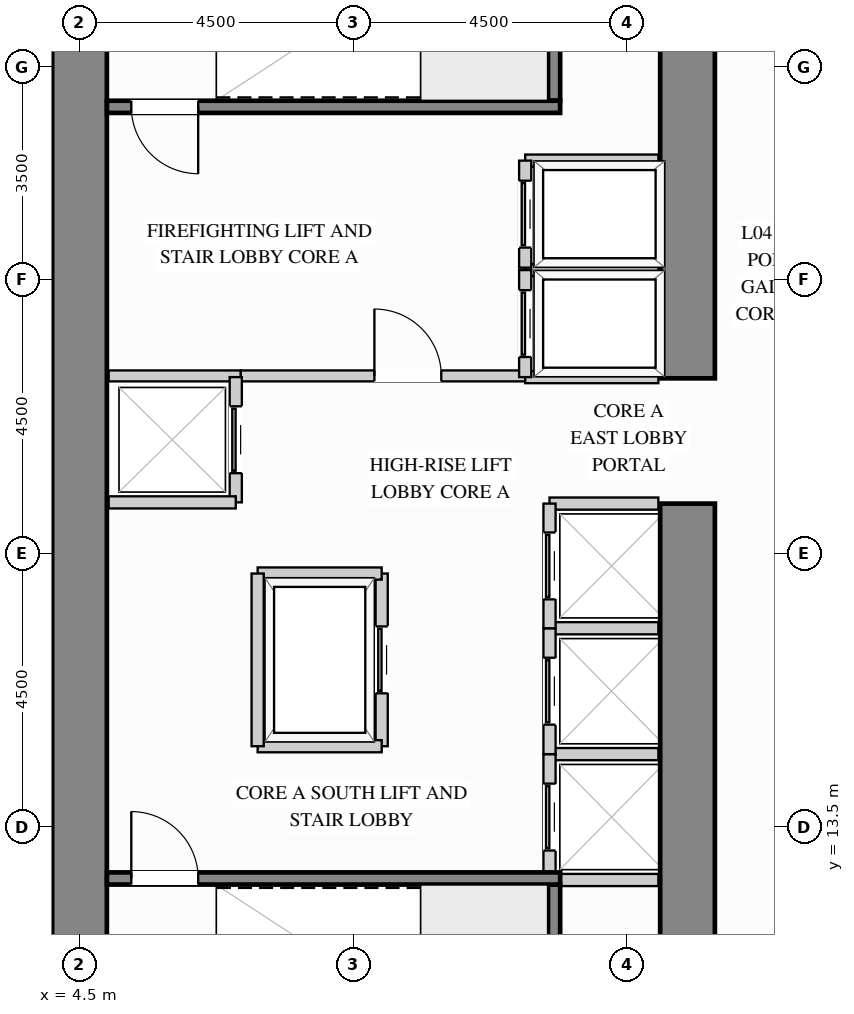
"""IFC4 building model, lengths in metres.
Left out: names, types, materials, properties, quantities, classifications, styles, units other than length and angle.
Written with IfcOpenShell. Run it as: python <this file> out.ifc"""

import sys

from ifc_helpers import new_model, si_unit, direction, frame, frame_2d, origin, place, context, subcontext, project, spatial, rectangle, extrude, source, transform, mapped, element, fill, save


model = new_model("IFC4")
c1 = context("Model", 3, precision=1e-05, world=origin(), true_north=direction((0.0, 1.0)))
c2 = subcontext(c1, "Body", "Model", "MODEL_VIEW")
j1 = project(units=[si_unit("LENGTHUNIT", "METRE"), si_unit("PLANEANGLEUNIT", "RADIAN")], contexts=[c1])
p1 = place(None, origin())
s1 = spatial("IfcSite", under=j1, at=p1, CompositionType="ELEMENT")
p2 = place(p1, origin())
s2 = spatial("IfcBuilding", under=s1, at=p2, CompositionType="ELEMENT")
p3 = place(p2, frame((0.0, 0.0, 18.0)))
s3 = spatial("IfcBuildingStorey", under=s2, at=p3, CompositionType="ELEMENT", Elevation=18.0)
m1 = source(origin(), c2, "Body", "SweptSolid", [
    extrude(rectangle(XDim=9.87, YDim=0.9, at=frame_2d((4.935, 0.0))), origin(), (0.0, 0.0, 1.0), 4.28),
])
p4 = place(p3, frame((14.5, 8.95, 0.0), z_axis=(0.0, 0.0, 1.0), x_axis=(0.0, 1.0, 0.0)))
e1 = element("IfcWall", 1, at=p4, inside=s3, PredefinedType="SHEAR", context=c2, shape_type="MappedRepresentation", body=[
    mapped(m1, transform((0.0, 0.0, 0.0), x_axis=(1.0, 0.0, 0.0), y_axis=(0.0, 1.0, 0.0), z_axis=(0.0, 0.0, 1.0))),
])
m2 = source(origin(), c2, "Body", "SweptSolid", [
    extrude(rectangle(XDim=8.17, YDim=0.9, at=frame_2d((4.085, 0.0))), origin(), (0.0, 0.0, 1.0), 4.28),
])
p5 = place(p3, frame((14.5, 20.88, 0.0), z_axis=(0.0, 0.0, 1.0), x_axis=(0.0, 1.0, 0.0)))
e2 = element("IfcWall", 2, at=p5, inside=s3, PredefinedType="SHEAR", context=c2, shape_type="MappedRepresentation", body=[
    mapped(m2, transform((0.0, 0.0, 0.0), x_axis=(1.0, 0.0, 0.0), y_axis=(0.0, 1.0, 0.0), z_axis=(0.0, 0.0, 1.0))),
])
m3 = source(origin(), c2, "Body", "SweptSolid", [
    extrude(rectangle(XDim=20.1, YDim=0.9, at=frame_2d((10.05, 0.0))), origin(), (0.0, 0.0, 1.0), 4.28),
])
p6 = place(p3, frame((4.5, 8.95, 0.0), z_axis=(0.0, 0.0, 1.0), x_axis=(0.0, 1.0, 0.0)))
e3 = element("IfcWall", 3, at=p6, inside=s3, PredefinedType="SHEAR", context=c2, shape_type="MappedRepresentation", body=[
    mapped(m3, transform((0.0, 0.0, 0.0), x_axis=(1.0, 0.0, 0.0), y_axis=(0.0, 1.0, 0.0), z_axis=(0.0, 0.0, 1.0))),
])
p7 = place(p3, frame((7.15, 20.92, 0.0), z_axis=(0.0, 0.0, 1.0), x_axis=(1.0, 0.0, 0.0)))
e4 = element("IfcWall", 4, at=p7, inside=s3, PredefinedType="PARTITIONING", context=c2, shape_type="SweptSolid", body=[
    extrude(rectangle(XDim=4.68, YDim=0.18, at=frame_2d((2.34, 0.0))), origin(), (0.0, 0.0, 1.0), 4.265),
])
p8 = place(p7, frame((2.2, 0.0, 0.0)))
e5 = element("IfcOpeningElement", 5, at=p8, cuts=e4, PredefinedType="OPENING", context=c2, shape_type="SweptSolid", body=[
    extrude(rectangle(XDim=1.1, YDim=2.15, at=frame_2d((0.55, 1.075))), frame((0.0, 0.1, 0.0), z_axis=(0.0, -1.0, 0.0), x_axis=(1.0, 0.0, 0.0)), (0.0, 0.0, 1.0), 0.2),
])
m4 = source(origin(), c2, "Body", "SweptSolid", [
    extrude(rectangle(XDim=2.17, YDim=0.18, at=frame_2d((1.085, 0.0))), origin(), (0.0, 0.0, 1.0), 4.265),
])
p9 = place(p3, frame((4.98, 20.92, 0.0), z_axis=(0.0, 0.0, 1.0), x_axis=(1.0, 0.0, 0.0)))
e6 = element("IfcWall", 6, at=p9, inside=s3, PredefinedType="PARTITIONING", context=c2, shape_type="MappedRepresentation", body=[
    mapped(m4, transform((0.0, 0.0, 0.0), x_axis=(1.0, 0.0, 0.0), y_axis=(0.0, 1.0, 0.0), z_axis=(0.0, 0.0, 1.0))),
])
m5 = source(origin(), c2, "Body", "SweptSolid", [
    extrude(rectangle(XDim=2.19, YDim=0.2, at=frame_2d((1.095, 0.0))), origin(), (0.0, 0.0, 1.0), 4.265),
])
for number, where, z_axis, x_axis in (
    (7, (11.83, 22.66, 0.0), (0.0, 0.0, 1.0), (1.0, 0.0, 0.0)),
    (8, (11.83, 20.9, 0.0), (0.0, 0.0, 1.0), (1.0, 0.0, 0.0)),
):
    element("IfcWall", number, at=place(p3, frame(where, z_axis=z_axis, x_axis=x_axis)), inside=s3, PredefinedType="PARTITIONING", context=c2, shape_type="MappedRepresentation", body=[
        mapped(m5, transform((0.0, 0.0, 0.0), x_axis=(1.0, 0.0, 0.0), y_axis=(0.0, 1.0, 0.0), z_axis=(0.0, 0.0, 1.0))),
    ])
p10 = place(p3, frame((11.83, 20.9, 0.0), z_axis=(0.0, 0.0, 1.0), x_axis=(0.0, 1.0, 0.0)))
e9 = element("IfcWall", 9, at=p10, inside=s3, PredefinedType="PARTITIONING", context=c2, shape_type="SweptSolid", body=[
    extrude(rectangle(XDim=1.76, YDim=0.2, at=frame_2d((0.88, 0.0))), origin(), (0.0, 0.0, 1.0), 4.265),
])
p11 = place(p10, frame((0.33, 0.0, 0.0)))
e10 = element("IfcOpeningElement", 10, at=p11, cuts=e9, PredefinedType="OPENING", context=c2, shape_type="SweptSolid", body=[
    extrude(rectangle(XDim=1.1, YDim=2.2, at=frame_2d((0.55, 1.1))), frame((0.0, 0.11, 0.0), z_axis=(0.0, -1.0, 0.0), x_axis=(1.0, 0.0, 0.0)), (0.0, 0.0, 1.0), 0.22),
])
p12 = place(p3, frame((11.83, 24.46, 0.0), z_axis=(0.0, 0.0, 1.0), x_axis=(1.0, 0.0, 0.0)))
e11 = element("IfcWall", 11, at=p12, inside=s3, PredefinedType="PARTITIONING", context=c2, shape_type="MappedRepresentation", body=[
    mapped(m5, transform((0.0, 0.0, 0.0), x_axis=(1.0, 0.0, 0.0), y_axis=(0.0, 1.0, 0.0), z_axis=(0.0, 0.0, 1.0))),
])
p13 = place(p3, frame((11.83, 22.7, 0.0), z_axis=(0.0, 0.0, 1.0), x_axis=(0.0, 1.0, 0.0)))
e12 = element("IfcWall", 12, at=p13, inside=s3, PredefinedType="PARTITIONING", context=c2, shape_type="SweptSolid", body=[
    extrude(rectangle(XDim=1.76, YDim=0.2, at=frame_2d((0.88, 0.0))), origin(), (0.0, 0.0, 1.0), 4.265),
])
p14 = place(p13, frame((0.33, 0.0, 0.0)))
e13 = element("IfcOpeningElement", 13, at=p14, cuts=e12, PredefinedType="OPENING", context=c2, shape_type="SweptSolid", body=[
    extrude(rectangle(XDim=1.1, YDim=2.2, at=frame_2d((0.55, 1.1))), frame((0.0, 0.11, 0.0), z_axis=(0.0, -1.0, 0.0), x_axis=(1.0, 0.0, 0.0)), (0.0, 0.0, 1.0), 0.22),
])
m6 = source(origin(), c2, "Body", "SweptSolid", [
    extrude(rectangle(XDim=1.79, YDim=0.2, at=frame_2d((0.895, 0.0))), origin(), (0.0, 0.0, 1.0), 4.265),
])
for number, where, z_axis, x_axis in (
    (14, (12.23, 14.7, 0.0), (0.0, 0.0, 1.0), (1.0, 0.0, 0.0)),
    (15, (12.23, 12.63, 0.0), (0.0, 0.0, 1.0), (1.0, 0.0, 0.0)),
):
    element("IfcWall", number, at=place(p3, frame(where, z_axis=z_axis, x_axis=x_axis)), inside=s3, PredefinedType="PARTITIONING", context=c2, shape_type="MappedRepresentation", body=[
        mapped(m6, transform((0.0, 0.0, 0.0), x_axis=(1.0, 0.0, 0.0), y_axis=(0.0, 1.0, 0.0), z_axis=(0.0, 0.0, 1.0))),
    ])
p15 = place(p3, frame((12.23, 12.63, 0.0), z_axis=(0.0, 0.0, 1.0), x_axis=(0.0, 1.0, 0.0)))
e16 = element("IfcWall", 16, at=p15, inside=s3, PredefinedType="PARTITIONING", context=c2, shape_type="SweptSolid", body=[
    extrude(rectangle(XDim=2.07, YDim=0.2, at=frame_2d((1.035, 0.0))), origin(), (0.0, 0.0, 1.0), 4.265),
])
p16 = place(p15, frame((0.485, 0.0, 0.0)))
e17 = element("IfcOpeningElement", 17, at=p16, cuts=e16, PredefinedType="OPENING", context=c2, shape_type="SweptSolid", body=[
    extrude(rectangle(XDim=1.1, YDim=2.2, at=frame_2d((0.55, 1.1))), frame((0.0, 0.11, 0.0), z_axis=(0.0, -1.0, 0.0), x_axis=(1.0, 0.0, 0.0)), (0.0, 0.0, 1.0), 0.22),
])
p17 = place(p3, frame((12.23, 16.77, 0.0), z_axis=(0.0, 0.0, 1.0), x_axis=(1.0, 0.0, 0.0)))
e18 = element("IfcWall", 18, at=p17, inside=s3, PredefinedType="PARTITIONING", context=c2, shape_type="MappedRepresentation", body=[
    mapped(m6, transform((0.0, 0.0, 0.0), x_axis=(1.0, 0.0, 0.0), y_axis=(0.0, 1.0, 0.0), z_axis=(0.0, 0.0, 1.0))),
])
p18 = place(p3, frame((12.23, 14.7, 0.0), z_axis=(0.0, 0.0, 1.0), x_axis=(0.0, 1.0, 0.0)))
e19 = element("IfcWall", 19, at=p18, inside=s3, PredefinedType="PARTITIONING", context=c2, shape_type="SweptSolid", body=[
    extrude(rectangle(XDim=2.07, YDim=0.2, at=frame_2d((1.035, 0.0))), origin(), (0.0, 0.0, 1.0), 4.265),
])
p19 = place(p18, frame((0.485, 0.0, 0.0)))
e20 = element("IfcOpeningElement", 20, at=p19, cuts=e19, PredefinedType="OPENING", context=c2, shape_type="SweptSolid", body=[
    extrude(rectangle(XDim=1.1, YDim=2.2, at=frame_2d((0.55, 1.1))), frame((0.0, 0.11, 0.0), z_axis=(0.0, -1.0, 0.0), x_axis=(1.0, 0.0, 0.0)), (0.0, 0.0, 1.0), 0.22),
])
p20 = place(p3, frame((12.23, 18.82, 0.0), z_axis=(0.0, 0.0, 1.0), x_axis=(1.0, 0.0, 0.0)))
e21 = element("IfcWall", 21, at=p20, inside=s3, PredefinedType="PARTITIONING", context=c2, shape_type="MappedRepresentation", body=[
    mapped(m6, transform((0.0, 0.0, 0.0), x_axis=(1.0, 0.0, 0.0), y_axis=(0.0, 1.0, 0.0), z_axis=(0.0, 0.0, 1.0))),
])
p21 = place(p3, frame((12.23, 16.77, 0.0), z_axis=(0.0, 0.0, 1.0), x_axis=(0.0, 1.0, 0.0)))
e22 = element("IfcWall", 22, at=p21, inside=s3, PredefinedType="PARTITIONING", context=c2, shape_type="SweptSolid", body=[
    extrude(rectangle(XDim=2.05, YDim=0.2, at=frame_2d((1.025, 0.0))), origin(), (0.0, 0.0, 1.0), 4.265),
])
p22 = place(p21, frame((0.475, 0.0, 0.0)))
e23 = element("IfcOpeningElement", 23, at=p22, cuts=e22, PredefinedType="OPENING", context=c2, shape_type="SweptSolid", body=[
    extrude(rectangle(XDim=1.1, YDim=2.2, at=frame_2d((0.55, 1.1))), frame((0.0, 0.11, 0.0), z_axis=(0.0, -1.0, 0.0), x_axis=(1.0, 0.0, 0.0)), (0.0, 0.0, 1.0), 0.22),
])
p23 = place(p3, frame((7.07, 18.84, 0.0), z_axis=(0.0, 0.0, 1.0), x_axis=(0.0, 1.0, 0.0)))
e24 = element("IfcWall", 24, at=p23, inside=s3, PredefinedType="PARTITIONING", context=c2, shape_type="SweptSolid", body=[
    extrude(rectangle(XDim=2.06, YDim=0.2, at=frame_2d((1.03, 0.0))), origin(), (0.0, 0.0, 1.0), 4.265),
])
p24 = place(p23, frame((0.48, 0.0, 0.0)))
e25 = element("IfcOpeningElement", 25, at=p24, cuts=e24, PredefinedType="OPENING", context=c2, shape_type="SweptSolid", body=[
    extrude(rectangle(XDim=1.1, YDim=2.2, at=frame_2d((0.55, 1.1))), frame((0.0, 0.11, 0.0), z_axis=(0.0, -1.0, 0.0), x_axis=(1.0, 0.0, 0.0)), (0.0, 0.0, 1.0), 0.22),
])
m7 = source(origin(), c2, "Body", "SweptSolid", [
    extrude(rectangle(XDim=2.09, YDim=0.2, at=frame_2d((1.045, 0.0))), origin(), (0.0, 0.0, 1.0), 4.265),
])
p25 = place(p3, frame((4.98, 18.84, 0.0), z_axis=(0.0, 0.0, 1.0), x_axis=(1.0, 0.0, 0.0)))
e26 = element("IfcWall", 26, at=p25, inside=s3, PredefinedType="PARTITIONING", context=c2, shape_type="MappedRepresentation", body=[
    mapped(m7, transform((0.0, 0.0, 0.0), x_axis=(1.0, 0.0, 0.0), y_axis=(0.0, 1.0, 0.0), z_axis=(0.0, 0.0, 1.0))),
])
p26 = place(p3, frame((9.47, 14.83, 0.0), z_axis=(0.0, 0.0, 1.0), x_axis=(0.0, 1.0, 0.0)))
e27 = element("IfcWall", 27, at=p26, inside=s3, PredefinedType="PARTITIONING", context=c2, shape_type="SweptSolid", body=[
    extrude(rectangle(XDim=2.84, YDim=0.2, at=frame_2d((1.42, 0.0))), origin(), (0.0, 0.0, 1.0), 4.265),
])
p27 = place(p26, frame((0.87, 0.0, 0.0)))
e28 = element("IfcOpeningElement", 28, at=p27, cuts=e27, PredefinedType="OPENING", context=c2, shape_type="SweptSolid", body=[
    extrude(rectangle(XDim=1.1, YDim=2.2, at=frame_2d((0.55, 1.1))), frame((0.0, 0.11, 0.0), z_axis=(0.0, -1.0, 0.0), x_axis=(1.0, 0.0, 0.0)), (0.0, 0.0, 1.0), 0.22),
])
m8 = source(origin(), c2, "Body", "SweptSolid", [
    extrude(rectangle(XDim=2.04, YDim=0.2, at=frame_2d((1.02, 0.0))), origin(), (0.0, 0.0, 1.0), 4.265),
])
for number, where, z_axis, x_axis in (
    (29, (7.43, 17.67, 0.0), (0.0, 0.0, 1.0), (1.0, 0.0, 0.0)),
    (30, (7.43, 14.83, 0.0), (0.0, 0.0, 1.0), (1.0, 0.0, 0.0)),
):
    element("IfcWall", number, at=place(p3, frame(where, z_axis=z_axis, x_axis=x_axis)), inside=s3, PredefinedType="PARTITIONING", context=c2, shape_type="MappedRepresentation", body=[
        mapped(m8, transform((0.0, 0.0, 0.0), x_axis=(1.0, 0.0, 0.0), y_axis=(0.0, 1.0, 0.0), z_axis=(0.0, 0.0, 1.0))),
    ])
m9 = source(origin(), c2, "Body", "SweptSolid", [
    extrude(rectangle(XDim=2.84, YDim=0.2, at=frame_2d((1.42, 0.0))), origin(), (0.0, 0.0, 1.0), 4.265),
])
p28 = place(p3, frame((7.43, 14.83, 0.0), z_axis=(0.0, 0.0, 1.0), x_axis=(0.0, 1.0, 0.0)))
e31 = element("IfcWall", 31, at=p28, inside=s3, PredefinedType="PARTITIONING", context=c2, shape_type="MappedRepresentation", body=[
    mapped(m9, transform((0.0, 0.0, 0.0), x_axis=(1.0, 0.0, 0.0), y_axis=(0.0, 1.0, 0.0), z_axis=(0.0, 0.0, 1.0))),
])
m10 = source(origin(), c2, "Body", "SweptSolid", [
    extrude(rectangle(XDim=3.603, YDim=0.2, at=frame_2d((1.802, 0.0))), origin(), (0.0, 0.0, 1.0), 4.28),
])
p29 = place(p3, frame((12.305, 8.952, 0.0), z_axis=(0.0, 0.0, 1.0), x_axis=(0.0, 1.0, 0.0)))
e32 = element("IfcWall", 32, at=p29, inside=s3, PredefinedType="SHEAR", context=c2, shape_type="MappedRepresentation", body=[
    mapped(m10, transform((0.0, 0.0, 0.0), x_axis=(1.0, 0.0, 0.0), y_axis=(0.0, 1.0, 0.0), z_axis=(0.0, 0.0, 1.0))),
])
p30 = place(p3, frame((4.952, 12.655, 0.0), z_axis=(0.0, 0.0, 1.0), x_axis=(1.0, 0.0, 0.0)))
e33 = element("IfcWall", 33, at=p30, inside=s3, PredefinedType="SHEAR", context=c2, shape_type="SweptSolid", body=[
    extrude(rectangle(XDim=7.453, YDim=0.2, at=frame_2d((3.727, 0.0))), origin(), (0.0, 0.0, 1.0), 4.28),
])
p31 = place(p30, frame((0.4, 0.0, 0.0)))
e34 = element("IfcOpeningElement", 34, at=p31, cuts=e33, PredefinedType="OPENING", context=c2, shape_type="SweptSolid", body=[
    extrude(rectangle(XDim=1.1, YDim=2.15, at=frame_2d((0.55, 1.075))), frame((0.0, 0.11, 0.0), z_axis=(0.0, -1.0, 0.0), x_axis=(1.0, 0.0, 0.0)), (0.0, 0.0, 1.0), 0.22),
])
p32 = place(p3, frame((12.305, 25.445, 0.0), z_axis=(0.0, 0.0, 1.0), x_axis=(0.0, 1.0, 0.0)))
e35 = element("IfcWall", 35, at=p32, inside=s3, PredefinedType="SHEAR", context=c2, shape_type="MappedRepresentation", body=[
    mapped(m10, transform((0.0, 0.0, 0.0), x_axis=(1.0, 0.0, 0.0), y_axis=(0.0, 1.0, 0.0), z_axis=(0.0, 0.0, 1.0))),
])
p33 = place(p3, frame((4.952, 25.345, 0.0), z_axis=(0.0, 0.0, 1.0), x_axis=(1.0, 0.0, 0.0)))
e36 = element("IfcWall", 36, at=p33, inside=s3, PredefinedType="SHEAR", context=c2, shape_type="SweptSolid", body=[
    extrude(rectangle(XDim=7.453, YDim=0.2, at=frame_2d((3.727, 0.0))), origin(), (0.0, 0.0, 1.0), 4.28),
])
p34 = place(p33, frame((0.4, 0.0, 0.0)))
e37 = element("IfcOpeningElement", 37, at=p34, cuts=e36, PredefinedType="OPENING", context=c2, shape_type="SweptSolid", body=[
    extrude(rectangle(XDim=1.1, YDim=2.15, at=frame_2d((0.55, 1.075))), frame((0.0, 0.11, 0.0), z_axis=(0.0, -1.0, 0.0), x_axis=(1.0, 0.0, 0.0)), (0.0, 0.0, 1.0), 0.22),
])
m11 = source(origin(), c2, "Body", "SweptSolid", [
    extrude(rectangle(XDim=1.1, YDim=2.15, at=frame_2d((0.55, 1.075))), frame((0.0, 0.025, 0.0), z_axis=(0.0, -1.0, 0.0), x_axis=(1.0, 0.0, 0.0)), (0.0, 0.0, 1.0), 0.05),
])
p35 = place(p8, origin())
e38 = element("IfcDoor", 38, at=p35, inside=s3, OperationType="SINGLE_SWING_LEFT", PredefinedType="DOOR", context=c2, shape_type="MappedRepresentation", body=[
    mapped(m11, transform((0.0, 0.0, 0.0), x_axis=(1.0, 0.0, 0.0), y_axis=(0.0, 1.0, 0.0), z_axis=(0.0, 0.0, 1.0))),
])
fill(e5, e38)
m12 = source(origin(), c2, "Body", "SweptSolid", [
    extrude(rectangle(XDim=1.1, YDim=2.2, at=frame_2d((0.55, 1.1))), frame((0.0, 0.025, 0.0), z_axis=(0.0, -1.0, 0.0), x_axis=(1.0, 0.0, 0.0)), (0.0, 0.0, 1.0), 0.05),
])
p36 = place(p11, origin())
e39 = element("IfcDoor", 39, at=p36, inside=s3, OperationType="SLIDING_TO_LEFT", PredefinedType="DOOR", context=c2, shape_type="MappedRepresentation", body=[
    mapped(m12, transform((0.0, 0.0, 0.0), x_axis=(1.0, 0.0, 0.0), y_axis=(0.0, 1.0, 0.0), z_axis=(0.0, 0.0, 1.0))),
])
fill(e10, e39)
p37 = place(p14, origin())
e40 = element("IfcDoor", 40, at=p37, inside=s3, OperationType="SLIDING_TO_LEFT", PredefinedType="DOOR", context=c2, shape_type="MappedRepresentation", body=[
    mapped(m12, transform((0.0, 0.0, 0.0), x_axis=(1.0, 0.0, 0.0), y_axis=(0.0, 1.0, 0.0), z_axis=(0.0, 0.0, 1.0))),
])
fill(e13, e40)
p38 = place(p16, origin())
e41 = element("IfcDoor", 41, at=p38, inside=s3, OperationType="SLIDING_TO_LEFT", PredefinedType="DOOR", context=c2, shape_type="MappedRepresentation", body=[
    mapped(m12, transform((0.0, 0.0, 0.0), x_axis=(1.0, 0.0, 0.0), y_axis=(0.0, 1.0, 0.0), z_axis=(0.0, 0.0, 1.0))),
])
fill(e17, e41)
p39 = place(p19, origin())
e42 = element("IfcDoor", 42, at=p39, inside=s3, OperationType="SLIDING_TO_LEFT", PredefinedType="DOOR", context=c2, shape_type="MappedRepresentation", body=[
    mapped(m12, transform((0.0, 0.0, 0.0), x_axis=(1.0, 0.0, 0.0), y_axis=(0.0, 1.0, 0.0), z_axis=(0.0, 0.0, 1.0))),
])
fill(e20, e42)
p40 = place(p22, origin())
e43 = element("IfcDoor", 43, at=p40, inside=s3, OperationType="SLIDING_TO_LEFT", PredefinedType="DOOR", context=c2, shape_type="MappedRepresentation", body=[
    mapped(m12, transform((0.0, 0.0, 0.0), x_axis=(1.0, 0.0, 0.0), y_axis=(0.0, 1.0, 0.0), z_axis=(0.0, 0.0, 1.0))),
])
fill(e23, e43)
p41 = place(p24, origin())
e44 = element("IfcDoor", 44, at=p41, inside=s3, OperationType="SLIDING_TO_LEFT", PredefinedType="DOOR", context=c2, shape_type="MappedRepresentation", body=[
    mapped(m12, transform((0.0, 0.0, 0.0), x_axis=(1.0, 0.0, 0.0), y_axis=(0.0, 1.0, 0.0), z_axis=(0.0, 0.0, 1.0))),
])
fill(e25, e44)
p42 = place(p27, origin())
e45 = element("IfcDoor", 45, at=p42, inside=s3, OperationType="SLIDING_TO_LEFT", PredefinedType="DOOR", context=c2, shape_type="MappedRepresentation", body=[
    mapped(m12, transform((0.0, 0.0, 0.0), x_axis=(1.0, 0.0, 0.0), y_axis=(0.0, 1.0, 0.0), z_axis=(0.0, 0.0, 1.0))),
])
fill(e28, e45)
m13 = source(origin(), c2, "Body", "SweptSolid", [
    extrude(rectangle(XDim=1.1, YDim=2.15, at=frame_2d((0.55, 1.075))), frame((0.0, 0.025, 0.0), z_axis=(0.0, -1.0, 0.0), x_axis=(1.0, 0.0, 0.0)), (0.0, 0.0, 1.0), 0.05),
])
p43 = place(p31, origin())
e46 = element("IfcDoor", 46, at=p43, inside=s3, OperationType="SINGLE_SWING_LEFT", PredefinedType="DOOR", context=c2, shape_type="MappedRepresentation", body=[
    mapped(m13, transform((0.0, 0.0, 0.0), x_axis=(1.0, 0.0, 0.0), y_axis=(0.0, 1.0, 0.0), z_axis=(0.0, 0.0, 1.0))),
])
fill(e34, e46)
p44 = place(p34, origin())
e47 = element("IfcDoor", 47, at=p44, inside=s3, OperationType="SINGLE_SWING_RIGHT", PredefinedType="DOOR", context=c2, shape_type="MappedRepresentation", body=[
    mapped(m13, transform((0.0, 0.0, 0.0), x_axis=(1.0, 0.0, 0.0), y_axis=(0.0, 1.0, 0.0), z_axis=(0.0, 0.0, 1.0))),
])
fill(e37, e47)
save(model, sys.argv[1])
